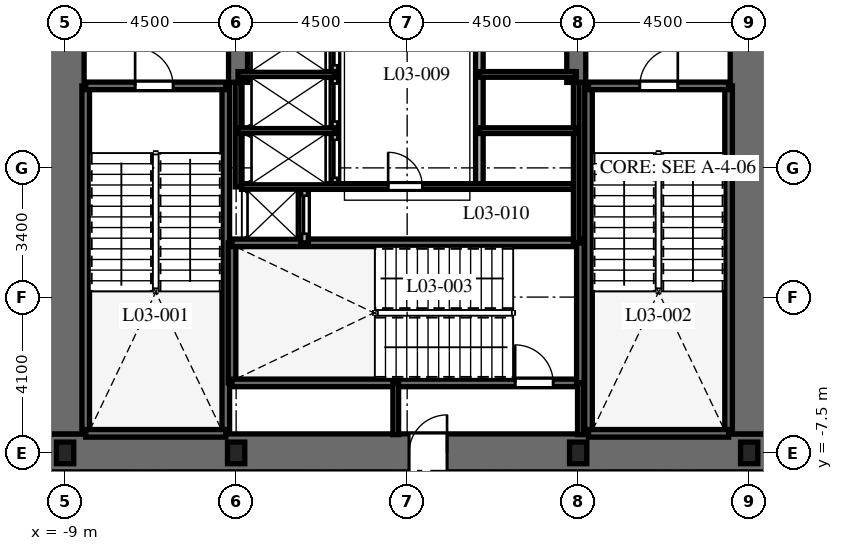
"""IFC4 building model, lengths in metres.
Left out: names, types, materials, properties, quantities, classifications, styles, units other than length and angle.
Written with IfcOpenShell. Run it as: python <this file> out.ifc"""

import sys

from ifc_helpers import new_model, si_unit, direction, frame, frame_2d, origin, origin_2d, place, context, subcontext, project, spatial, rectangle, i_section, extrude, element, fill, save


model = new_model("IFC4")
c1 = context("Model", 3, precision=1e-05, world=origin(), true_north=direction((0.0, 1.0)))
c2 = subcontext(c1, "Body", "Model", "MODEL_VIEW")
j1 = project(units=[si_unit("LENGTHUNIT", "METRE"), si_unit("PLANEANGLEUNIT", "RADIAN")], contexts=[c1])
p1 = place(None, origin())
s1 = spatial("IfcSite", under=j1, at=p1, CompositionType="ELEMENT")
p2 = place(p1, origin())
s2 = spatial("IfcBuilding", under=s1, at=p2, CompositionType="ELEMENT")
p3 = place(p2, frame((0.0, 0.0, 18.6)))
s3 = spatial("IfcBuildingStorey", under=s2, at=p3, CompositionType="ELEMENT", Elevation=18.6)
p4 = place(p3, frame((-9.5, -7.5, 0.0), z_axis=(0.0, 0.0, 1.0), x_axis=(1.0, 0.0, 0.0)))
e1 = element("IfcWall", 1, at=p4, inside=s3, PredefinedType="SHEAR", context=c2, shape_type="SweptSolid", body=[
    extrude(rectangle(XDim=19.0, YDim=1.0, at=frame_2d((9.5, 0.0))), origin(), (0.0, 0.0, 1.0), 4.8),
])
p5 = place(p4, frame((9.55, 0.0, 0.0)))
e2 = element("IfcOpeningElement", 2, at=p5, cuts=e1, PredefinedType="OPENING", context=c2, shape_type="SweptSolid", body=[
    extrude(rectangle(XDim=1.0, YDim=2.15, at=frame_2d((0.5, 1.075))), frame((0.0, 0.51, 0.0), z_axis=(0.0, -1.0, 0.0), x_axis=(1.0, 0.0, 0.0)), (0.0, 0.0, 1.0), 1.02),
])
p6 = place(p3, frame((-9.0, -7.0, 0.0), z_axis=(0.0, 0.0, 1.0), x_axis=(0.0, 1.0, 0.0)))
e3 = element("IfcWall", 3, at=p6, inside=s3, PredefinedType="SHEAR", context=c2, shape_type="SweptSolid", body=[
    extrude(rectangle(XDim=14.0, YDim=1.0, at=frame_2d((7.0, 0.0))), origin(), (0.0, 0.0, 1.0), 4.8),
])
p7 = place(p6, frame((10.125, 0.0, 0.0)))
e4 = element("IfcOpeningElement", 4, at=p7, cuts=e3, PredefinedType="OPENING", context=c2, shape_type="SweptSolid", body=[
    extrude(rectangle(XDim=1.05, YDim=2.15, at=frame_2d((0.525, 1.075))), frame((0.0, 0.51, 0.0), z_axis=(0.0, -1.0, 0.0), x_axis=(1.0, 0.0, 0.0)), (0.0, 0.0, 1.0), 1.02),
])
p8 = place(p3, frame((9.0, -7.0, 0.0), z_axis=(0.0, 0.0, 1.0), x_axis=(0.0, 1.0, 0.0)))
e5 = element("IfcWall", 5, at=p8, inside=s3, PredefinedType="SHEAR", context=c2, shape_type="SweptSolid", body=[
    extrude(rectangle(XDim=14.0, YDim=1.0, at=frame_2d((7.0, 0.0))), origin(), (0.0, 0.0, 1.0), 4.8),
])
p9 = place(p8, frame((10.125, 0.0, 0.0)))
e6 = element("IfcOpeningElement", 6, at=p9, cuts=e5, PredefinedType="OPENING", context=c2, shape_type="SweptSolid", body=[
    extrude(rectangle(XDim=1.05, YDim=2.15, at=frame_2d((0.525, 1.075))), frame((0.0, 0.51, 0.0), z_axis=(0.0, -1.0, 0.0), x_axis=(1.0, 0.0, 0.0)), (0.0, 0.0, 1.0), 1.02),
])
for number, where, z_axis, x_axis in (
    (7, (-4.45, 2.25, 0.0), (0.0, 0.0, 1.0), (0.0, 1.0, 0.0)),
    (8, (4.45, 2.25, 0.0), (0.0, 0.0, 1.0), (0.0, 1.0, 0.0)),
):
    element("IfcWall", number, at=place(p3, frame(where, z_axis=z_axis, x_axis=x_axis)), inside=s3, PredefinedType="SHEAR", context=c2, shape_type="SweptSolid", body=[
        extrude(rectangle(XDim=4.75, YDim=0.5, at=frame_2d((2.375, 0.0))), origin(), (0.0, 0.0, 1.0), 4.8),
    ])
for number, where, z_axis, x_axis in (
    (9, (-8.458, -6.985, 0.0), (0.0, 0.0, 1.0), (0.0, 1.0, 0.0)),
    (10, (-4.772, -6.985, 0.0), (0.0, 0.0, 1.0), (0.0, 1.0, 0.0)),
):
    element("IfcWall", number, at=place(p3, frame(where, z_axis=z_axis, x_axis=x_axis)), inside=s3, PredefinedType="SHEAR", context=c2, shape_type="SweptSolid", body=[
        extrude(rectangle(XDim=9.143, YDim=0.2, at=frame_2d((4.572, 0.0))), origin(), (0.0, 0.0, 1.0), 4.8),
    ])
p10 = place(p3, frame((-8.458, -6.985, 0.0), z_axis=(0.0, 0.0, 1.0), x_axis=(1.0, 0.0, 0.0)))
e11 = element("IfcWall", 11, at=p10, inside=s3, PredefinedType="SHEAR", context=c2, shape_type="SweptSolid", body=[
    extrude(rectangle(XDim=3.686, YDim=0.2, at=frame_2d((1.843, 0.0))), origin(), (0.0, 0.0, 1.0), 4.8),
])
p11 = place(p3, frame((-8.458, 2.158, 0.0), z_axis=(0.0, 0.0, 1.0), x_axis=(1.0, 0.0, 0.0)))
e12 = element("IfcWall", 12, at=p11, inside=s3, PredefinedType="SHEAR", context=c2, shape_type="SweptSolid", body=[
    extrude(rectangle(XDim=3.686, YDim=0.2, at=frame_2d((1.843, 0.0))), origin(), (0.0, 0.0, 1.0), 4.8),
])
p12 = place(p11, frame((1.3, 0.0, 0.0)))
e13 = element("IfcOpeningElement", 13, at=p12, cuts=e12, PredefinedType="OPENING", context=c2, shape_type="SweptSolid", body=[
    extrude(rectangle(XDim=1.0, YDim=2.15, at=frame_2d((0.5, 1.075))), frame((0.0, 0.11, 0.0), z_axis=(0.0, -1.0, 0.0), x_axis=(1.0, 0.0, 0.0)), (0.0, 0.0, 1.0), 0.22),
])
for number, where, z_axis, x_axis in (
    (14, (4.772, -6.985, 0.0), (0.0, 0.0, 1.0), (0.0, 1.0, 0.0)),
    (15, (8.458, -6.985, 0.0), (0.0, 0.0, 1.0), (0.0, 1.0, 0.0)),
):
    element("IfcWall", number, at=place(p3, frame(where, z_axis=z_axis, x_axis=x_axis)), inside=s3, PredefinedType="SHEAR", context=c2, shape_type="SweptSolid", body=[
        extrude(rectangle(XDim=9.143, YDim=0.2, at=frame_2d((4.572, 0.0))), origin(), (0.0, 0.0, 1.0), 4.8),
    ])
p13 = place(p3, frame((4.772, -6.985, 0.0), z_axis=(0.0, 0.0, 1.0), x_axis=(1.0, 0.0, 0.0)))
e16 = element("IfcWall", 16, at=p13, inside=s3, PredefinedType="SHEAR", context=c2, shape_type="SweptSolid", body=[
    extrude(rectangle(XDim=3.686, YDim=0.2, at=frame_2d((1.843, 0.0))), origin(), (0.0, 0.0, 1.0), 4.8),
])
p14 = place(p3, frame((4.772, 2.158, 0.0), z_axis=(0.0, 0.0, 1.0), x_axis=(1.0, 0.0, 0.0)))
e17 = element("IfcWall", 17, at=p14, inside=s3, PredefinedType="SHEAR", context=c2, shape_type="SweptSolid", body=[
    extrude(rectangle(XDim=3.686, YDim=0.2, at=frame_2d((1.843, 0.0))), origin(), (0.0, 0.0, 1.0), 4.8),
])
p15 = place(p14, frame((1.35, 0.0, 0.0)))
e18 = element("IfcOpeningElement", 18, at=p15, cuts=e17, PredefinedType="OPENING", context=c2, shape_type="SweptSolid", body=[
    extrude(rectangle(XDim=1.0, YDim=2.15, at=frame_2d((0.5, 1.075))), frame((0.0, 0.11, 0.0), z_axis=(0.0, -1.0, 0.0), x_axis=(1.0, 0.0, 0.0)), (0.0, 0.0, 1.0), 0.22),
])
p16 = place(p3, frame((-4.608, -5.658, 0.0), z_axis=(0.0, 0.0, 1.0), x_axis=(0.0, 1.0, 0.0)))
e19 = element("IfcWall", 19, at=p16, inside=s3, PredefinedType="SHEAR", context=c2, shape_type="SweptSolid", body=[
    extrude(rectangle(XDim=3.686, YDim=0.2, at=frame_2d((1.843, 0.0))), origin(), (0.0, 0.0, 1.0), 4.8),
])
p17 = place(p3, frame((-4.608, -5.658, 0.0), z_axis=(0.0, 0.0, 1.0), x_axis=(1.0, 0.0, 0.0)))
e20 = element("IfcWall", 20, at=p17, inside=s3, PredefinedType="SHEAR", context=c2, shape_type="SweptSolid", body=[
    extrude(rectangle(XDim=9.166, YDim=0.2, at=frame_2d((4.583, 0.0))), origin(), (0.0, 0.0, 1.0), 4.8),
])
p18 = place(p17, frame((7.45, 0.0, 0.0)))
e21 = element("IfcOpeningElement", 21, at=p18, cuts=e20, PredefinedType="OPENING", context=c2, shape_type="SweptSolid", body=[
    extrude(rectangle(XDim=1.0, YDim=2.15, at=frame_2d((0.5, 1.075))), frame((0.0, 0.11, 0.0), z_axis=(0.0, -1.0, 0.0), x_axis=(1.0, 0.0, 0.0)), (0.0, 0.0, 1.0), 0.22),
])
p19 = place(p3, frame((-4.608, -1.972, 0.0), z_axis=(0.0, 0.0, 1.0), x_axis=(1.0, 0.0, 0.0)))
e22 = element("IfcWall", 22, at=p19, inside=s3, PredefinedType="SHEAR", context=c2, shape_type="SweptSolid", body=[
    extrude(rectangle(XDim=9.166, YDim=0.2, at=frame_2d((4.583, 0.0))), origin(), (0.0, 0.0, 1.0), 4.8),
])
p20 = place(p3, frame((4.558, -5.658, 0.0), z_axis=(0.0, 0.0, 1.0), x_axis=(0.0, 1.0, 0.0)))
e23 = element("IfcWall", 23, at=p20, inside=s3, PredefinedType="SHEAR", context=c2, shape_type="SweptSolid", body=[
    extrude(rectangle(XDim=3.686, YDim=0.2, at=frame_2d((1.843, 0.0))), origin(), (0.0, 0.0, 1.0), 4.8),
])
for number, where, z_axis, x_axis in (
    (24, (-9.0, -7.5, 0.0), (0.0, 0.0, 1.0), (1.0, 0.0, 0.0)),
    (25, (-4.5, -7.5, 0.0), (0.0, 0.0, 1.0), (1.0, 0.0, 0.0)),
    (26, (4.5, -7.5, 0.0), (0.0, 0.0, 1.0), (1.0, 0.0, 0.0)),
    (27, (9.0, -7.5, 0.0), (0.0, 0.0, 1.0), (1.0, 0.0, 0.0)),
):
    element("IfcColumn", number, at=place(p3, frame(where, z_axis=z_axis, x_axis=x_axis)), inside=s3, PredefinedType="COLUMN", context=c2, shape_type="SweptSolid", body=[
        extrude(i_section(OverallWidth=0.454, OverallDepth=0.569, WebThickness=0.078, FlangeThickness=0.125, at=origin_2d()), origin(), (0.0, 0.0, 1.0), 4.8),
    ])
for number, where, z_axis, x_axis in (
    (28, (-0.3, -7.02, 0.0), (0.0, 0.0, 1.0), (0.0, 1.0, 0.0)),
    (29, (4.558, -7.02, 0.0), (0.0, 0.0, 1.0), (0.0, 1.0, 0.0)),
):
    element("IfcWall", number, at=place(p3, frame(where, z_axis=z_axis, x_axis=x_axis)), inside=s3, PredefinedType="PARTITIONING", context=c2, shape_type="SweptSolid", body=[
        extrude(rectangle(XDim=1.362, YDim=0.15, at=frame_2d((0.681, 0.0))), origin(), (0.0, 0.0, 1.0), 4.48),
    ])
p21 = place(p3, frame((-2.7, -1.972, 0.0), z_axis=(0.0, 0.0, 1.0), x_axis=(0.0, 1.0, 0.0)))
e30 = element("IfcWall", 30, at=p21, inside=s3, PredefinedType="PARTITIONING", context=c2, shape_type="SweptSolid", body=[
    extrude(rectangle(XDim=1.472, YDim=0.2, at=frame_2d((0.736, 0.0))), origin(), (0.0, 0.0, 1.0), 4.48),
])
p22 = place(p21, frame((0.24, 0.0, 0.0)))
e31 = element("IfcOpeningElement", 31, at=p22, cuts=e30, PredefinedType="OPENING", context=c2, shape_type="SweptSolid", body=[
    extrude(rectangle(XDim=1.0, YDim=2.2, at=frame_2d((0.5, 1.1))), frame((0.0, 0.11, 0.0), z_axis=(0.0, -1.0, 0.0), x_axis=(1.0, 0.0, 0.0)), (0.0, 0.0, 1.0), 0.22),
])
p23 = place(p3, frame((-4.45, -0.5, 0.0), z_axis=(0.0, 0.0, 1.0), x_axis=(0.0, 1.0, 0.0)))
e32 = element("IfcWall", 32, at=p23, inside=s3, PredefinedType="PARTITIONING", context=c2, shape_type="SweptSolid", body=[
    extrude(rectangle(XDim=2.75, YDim=0.15, at=frame_2d((1.375, 0.0))), origin(), (0.0, 0.0, 1.0), 4.48),
])
p24 = place(p3, frame((4.45, -1.972, 0.0), z_axis=(0.0, 0.0, 1.0), x_axis=(0.0, 1.0, 0.0)))
e33 = element("IfcWall", 33, at=p24, inside=s3, PredefinedType="PARTITIONING", context=c2, shape_type="SweptSolid", body=[
    extrude(rectangle(XDim=4.222, YDim=0.15, at=frame_2d((2.111, 0.0))), origin(), (0.0, 0.0, 1.0), 4.48),
])
p25 = place(p3, frame((-1.9, -0.5, 0.0), z_axis=(0.0, 0.0, 1.0), x_axis=(0.0, 1.0, 0.0)))
e34 = element("IfcWall", 34, at=p25, inside=s3, PredefinedType="PARTITIONING", context=c2, shape_type="SweptSolid", body=[
    extrude(rectangle(XDim=4.44, YDim=0.2, at=frame_2d((2.22, 0.0))), origin(), (0.0, 0.0, 1.0), 4.48),
])
p26 = place(p25, frame((0.24, 0.0, 0.0)))
e35 = element("IfcOpeningElement", 35, at=p26, cuts=e34, PredefinedType="OPENING", context=c2, shape_type="SweptSolid", body=[
    extrude(rectangle(XDim=1.0, YDim=2.2, at=frame_2d((0.5, 1.1))), frame((0.0, 0.11, 0.0), z_axis=(0.0, -1.0, 0.0), x_axis=(1.0, 0.0, 0.0)), (0.0, 0.0, 1.0), 0.22),
])
p27 = place(p25, frame((1.72, 0.0, 0.0)))
e36 = element("IfcOpeningElement", 36, at=p27, cuts=e34, PredefinedType="OPENING", context=c2, shape_type="SweptSolid", body=[
    extrude(rectangle(XDim=1.0, YDim=2.2, at=frame_2d((0.5, 1.1))), frame((0.0, 0.11, 0.0), z_axis=(0.0, -1.0, 0.0), x_axis=(1.0, 0.0, 0.0)), (0.0, 0.0, 1.0), 0.22),
])
p28 = place(p25, frame((3.2, 0.0, 0.0)))
e37 = element("IfcOpeningElement", 37, at=p28, cuts=e34, PredefinedType="OPENING", context=c2, shape_type="SweptSolid", body=[
    extrude(rectangle(XDim=1.0, YDim=2.2, at=frame_2d((0.5, 1.1))), frame((0.0, 0.11, 0.0), z_axis=(0.0, -1.0, 0.0), x_axis=(1.0, 0.0, 0.0)), (0.0, 0.0, 1.0), 0.22),
])
for number, where, z_axis, x_axis in (
    (38, (-4.45, 0.98, 0.0), (0.0, 0.0, 1.0), (1.0, 0.0, 0.0)),
    (39, (-4.45, 2.46, 0.0), (0.0, 0.0, 1.0), (1.0, 0.0, 0.0)),
):
    element("IfcWall", number, at=place(p3, frame(where, z_axis=z_axis, x_axis=x_axis)), inside=s3, PredefinedType="PARTITIONING", context=c2, shape_type="SweptSolid", body=[
        extrude(rectangle(XDim=2.55, YDim=0.15, at=frame_2d((1.275, 0.0))), origin(), (0.0, 0.0, 1.0), 4.48),
    ])
p29 = place(p3, frame((1.9, -0.5, 0.0), z_axis=(0.0, 0.0, 1.0), x_axis=(0.0, 1.0, 0.0)))
e40 = element("IfcWall", 40, at=p29, inside=s3, PredefinedType="PARTITIONING", context=c2, shape_type="SweptSolid", body=[
    extrude(rectangle(XDim=4.44, YDim=0.2, at=frame_2d((2.22, 0.0))), origin(), (0.0, 0.0, 1.0), 4.48),
])
for number, where, z_axis, x_axis in (
    (41, (1.9, 0.98, 0.0), (0.0, 0.0, 1.0), (1.0, 0.0, 0.0)),
    (42, (1.9, 2.46, 0.0), (0.0, 0.0, 1.0), (1.0, 0.0, 0.0)),
):
    element("IfcWall", number, at=place(p3, frame(where, z_axis=z_axis, x_axis=x_axis)), inside=s3, PredefinedType="PARTITIONING", context=c2, shape_type="SweptSolid", body=[
        extrude(rectangle(XDim=2.55, YDim=0.15, at=frame_2d((1.275, 0.0))), origin(), (0.0, 0.0, 1.0), 4.48),
    ])
p30 = place(p3, frame((-4.36, -0.49, 0.0), z_axis=(0.0, 0.0, 1.0), x_axis=(1.0, 0.0, 0.0)))
e43 = element("IfcWall", 43, at=p30, inside=s3, PredefinedType="PARTITIONING", context=c2, shape_type="SweptSolid", body=[
    extrude(rectangle(XDim=8.72, YDim=0.15, at=frame_2d((4.36, 0.0))), origin(), (0.0, 0.0, 1.0), 4.48),
])
p31 = place(p30, frame((3.86, 0.0, 0.0)))
e44 = element("IfcOpeningElement", 44, at=p31, cuts=e43, PredefinedType="OPENING", context=c2, shape_type="SweptSolid", body=[
    extrude(rectangle(XDim=0.9, YDim=2.03, at=frame_2d((0.45, 1.015))), frame((0.0, 0.085, 0.0), z_axis=(0.0, -1.0, 0.0), x_axis=(1.0, 0.0, 0.0)), (0.0, 0.0, 1.0), 0.17),
])
p32 = place(p12, origin())
e45 = element("IfcDoor", 45, at=p32, inside=s3, OperationType="SINGLE_SWING_LEFT", PredefinedType="DOOR", context=c2, shape_type="SweptSolid", body=[
    extrude(rectangle(XDim=1.0, YDim=2.15, at=frame_2d((0.5, 1.075))), frame((0.0, 0.025, 0.0), z_axis=(0.0, -1.0, 0.0), x_axis=(1.0, 0.0, 0.0)), (0.0, 0.0, 1.0), 0.05),
])
fill(e13, e45)
p33 = place(p15, origin())
e46 = element("IfcDoor", 46, at=p33, inside=s3, OperationType="SINGLE_SWING_RIGHT", PredefinedType="DOOR", context=c2, shape_type="SweptSolid", body=[
    extrude(rectangle(XDim=1.0, YDim=2.15, at=frame_2d((0.5, 1.075))), frame((0.0, 0.025, 0.0), z_axis=(0.0, -1.0, 0.0), x_axis=(1.0, 0.0, 0.0)), (0.0, 0.0, 1.0), 0.05),
])
fill(e18, e46)
p34 = place(p18, origin())
e47 = element("IfcDoor", 47, at=p34, inside=s3, OperationType="SINGLE_SWING_LEFT", PredefinedType="DOOR", context=c2, shape_type="SweptSolid", body=[
    extrude(rectangle(XDim=1.0, YDim=2.15, at=frame_2d((0.5, 1.075))), frame((0.0, 0.025, 0.0), z_axis=(0.0, -1.0, 0.0), x_axis=(1.0, 0.0, 0.0)), (0.0, 0.0, 1.0), 0.05),
])
fill(e21, e47)
p35 = place(p5, origin())
e48 = element("IfcDoor", 48, at=p35, inside=s3, OperationType="SINGLE_SWING_RIGHT", PredefinedType="DOOR", context=c2, shape_type="SweptSolid", body=[
    extrude(rectangle(XDim=1.0, YDim=2.15, at=frame_2d((0.5, 1.075))), frame((0.0, 0.025, 0.0), z_axis=(0.0, -1.0, 0.0), x_axis=(1.0, 0.0, 0.0)), (0.0, 0.0, 1.0), 0.05),
])
fill(e2, e48)
p36 = place(p22, origin())
e49 = element("IfcDoor", 49, at=p36, inside=s3, OperationType="SLIDING_TO_LEFT", PredefinedType="DOOR", context=c2, shape_type="SweptSolid", body=[
    extrude(rectangle(XDim=1.0, YDim=2.2, at=frame_2d((0.5, 1.1))), frame((0.0, 0.025, 0.0), z_axis=(0.0, -1.0, 0.0), x_axis=(1.0, 0.0, 0.0)), (0.0, 0.0, 1.0), 0.05),
])
fill(e31, e49)
p37 = place(p26, origin())
e50 = element("IfcDoor", 50, at=p37, inside=s3, OperationType="SLIDING_TO_LEFT", PredefinedType="DOOR", context=c2, shape_type="SweptSolid", body=[
    extrude(rectangle(XDim=1.0, YDim=2.2, at=frame_2d((0.5, 1.1))), frame((0.0, 0.025, 0.0), z_axis=(0.0, -1.0, 0.0), x_axis=(1.0, 0.0, 0.0)), (0.0, 0.0, 1.0), 0.05),
])
fill(e35, e50)
p38 = place(p27, origin())
e51 = element("IfcDoor", 51, at=p38, inside=s3, OperationType="SLIDING_TO_LEFT", PredefinedType="DOOR", context=c2, shape_type="SweptSolid", body=[
    extrude(rectangle(XDim=1.0, YDim=2.2, at=frame_2d((0.5, 1.1))), frame((0.0, 0.025, 0.0), z_axis=(0.0, -1.0, 0.0), x_axis=(1.0, 0.0, 0.0)), (0.0, 0.0, 1.0), 0.05),
])
fill(e36, e51)
p39 = place(p28, origin())
e52 = element("IfcDoor", 52, at=p39, inside=s3, OperationType="SLIDING_TO_LEFT", PredefinedType="DOOR", context=c2, shape_type="SweptSolid", body=[
    extrude(rectangle(XDim=1.0, YDim=2.2, at=frame_2d((0.5, 1.1))), frame((0.0, 0.025, 0.0), z_axis=(0.0, -1.0, 0.0), x_axis=(1.0, 0.0, 0.0)), (0.0, 0.0, 1.0), 0.05),
])
fill(e37, e52)
p40 = place(p31, origin())
e53 = element("IfcDoor", 53, at=p40, inside=s3, OperationType="SINGLE_SWING_LEFT", PredefinedType="DOOR", context=c2, shape_type="SweptSolid", body=[
    extrude(rectangle(XDim=0.9, YDim=2.03, at=frame_2d((0.45, 1.015))), frame((0.0, 0.025, 0.0), z_axis=(0.0, -1.0, 0.0), x_axis=(1.0, 0.0, 0.0)), (0.0, 0.0, 1.0), 0.05),
])
fill(e44, e53)
save(model, sys.argv[1])
